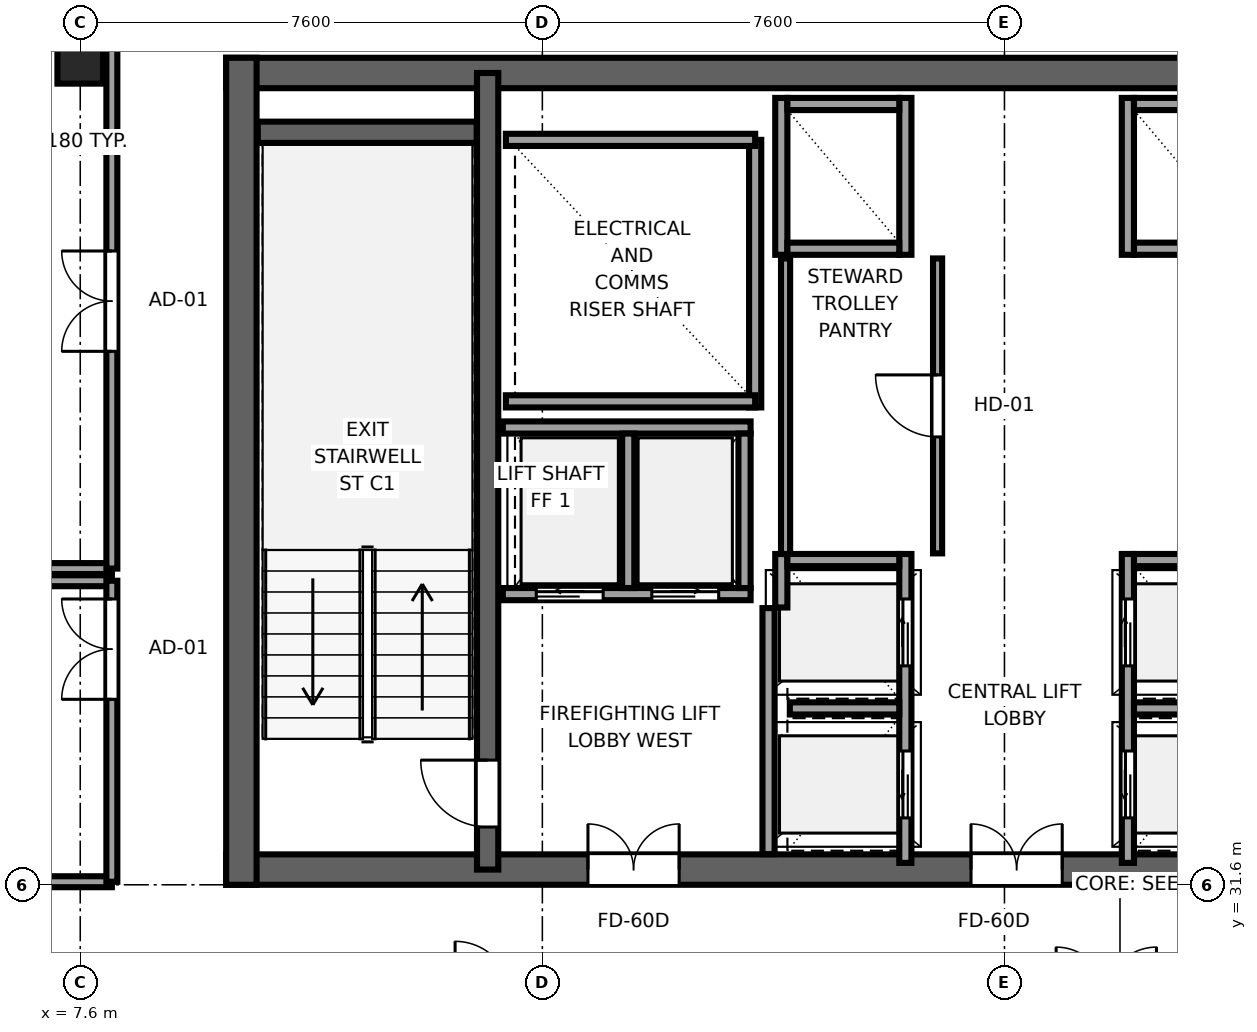
"""IFC4 building model, lengths in metres.
Left out: names, types, materials, properties, quantities, classifications, styles, units other than length and angle.
Written with IfcOpenShell. Run it as: python <this file> out.ifc"""

import sys

from ifc_helpers import new_model, si_unit, direction, frame, frame_2d, origin, origin_2d, place, context, subcontext, project, spatial, rectangle, extrude, source, transform, mapped, element, fill, save


model = new_model("IFC4")
c1 = context("Model", 3, precision=1e-05, world=origin(), true_north=direction((0.0, 1.0)))
c2 = subcontext(c1, "Body", "Model", "MODEL_VIEW")
j1 = project(units=[si_unit("LENGTHUNIT", "METRE"), si_unit("PLANEANGLEUNIT", "RADIAN")], contexts=[c1])
p1 = place(None, origin())
s1 = spatial("IfcSite", under=j1, at=p1, CompositionType="ELEMENT")
p2 = place(p1, origin())
s2 = spatial("IfcBuilding", under=s1, at=p2, CompositionType="ELEMENT")
p3 = place(p2, frame((0.0, 0.0, 231.0)))
s3 = spatial("IfcBuildingStorey", under=s2, at=p3, CompositionType="ELEMENT", Elevation=231.0)
p4 = place(p3, frame((10.0, 31.85, 0.0), z_axis=(0.0, 0.0, 1.0), x_axis=(1.0, 0.0, 0.0)))
e1 = element("IfcWall", 1, at=p4, inside=s3, PredefinedType="SHEAR", context=c2, shape_type="SweptSolid", body=[
    extrude(rectangle(XDim=26.0, YDim=0.5, at=frame_2d((13.0, 0.0))), origin(), (0.0, 0.0, 1.0), 3.55),
])
p5 = place(p4, frame((7.45, 0.0, 0.0), z_axis=(0.0, 0.0, 1.0), x_axis=(-1.0, 0.0, 0.0)))
e2 = element("IfcOpeningElement", 2, at=p5, cuts=e1, PredefinedType="OPENING", context=c2, shape_type="SweptSolid", body=[
    extrude(rectangle(XDim=1.5, YDim=2.04, at=frame_2d((0.75, 1.02))), frame((0.0, 0.26, 0.0), z_axis=(0.0, -1.0, 0.0), x_axis=(1.0, 0.0, 0.0)), (0.0, 0.0, 1.0), 0.52),
])
p6 = place(p4, frame((13.75, 0.0, 0.0), z_axis=(0.0, 0.0, 1.0), x_axis=(-1.0, 0.0, 0.0)))
e3 = element("IfcOpeningElement", 3, at=p6, cuts=e1, PredefinedType="OPENING", context=c2, shape_type="SweptSolid", body=[
    extrude(rectangle(XDim=1.5, YDim=2.04, at=frame_2d((0.75, 1.02))), frame((0.0, 0.26, 0.0), z_axis=(0.0, -1.0, 0.0), x_axis=(1.0, 0.0, 0.0)), (0.0, 0.0, 1.0), 0.52),
])
p7 = place(p4, frame((20.05, 0.0, 0.0), z_axis=(0.0, 0.0, 1.0), x_axis=(-1.0, 0.0, 0.0)))
e4 = element("IfcOpeningElement", 4, at=p7, cuts=e1, PredefinedType="OPENING", context=c2, shape_type="SweptSolid", body=[
    extrude(rectangle(XDim=1.5, YDim=2.04, at=frame_2d((0.75, 1.02))), frame((0.0, 0.26, 0.0), z_axis=(0.0, -1.0, 0.0), x_axis=(1.0, 0.0, 0.0)), (0.0, 0.0, 1.0), 0.52),
])
p8 = place(p3, frame((10.0, 44.95, 0.0), z_axis=(0.0, 0.0, 1.0), x_axis=(1.0, 0.0, 0.0)))
e5 = element("IfcWall", 5, at=p8, inside=s3, PredefinedType="SHEAR", context=c2, shape_type="SweptSolid", body=[
    extrude(rectangle(XDim=26.0, YDim=0.5, at=frame_2d((13.0, 0.0))), origin(), (0.0, 0.0, 1.0), 3.55),
])
p9 = place(p3, frame((10.25, 31.6, 0.0), z_axis=(0.0, 0.0, 1.0), x_axis=(0.0, 1.0, 0.0)))
e6 = element("IfcWall", 6, at=p9, inside=s3, PredefinedType="SHEAR", context=c2, shape_type="SweptSolid", body=[
    extrude(rectangle(XDim=13.6, YDim=0.5, at=frame_2d((6.8, 0.0))), origin(), (0.0, 0.0, 1.0), 3.55),
])
p10 = place(p3, frame((14.3, 31.85, 0.0), z_axis=(0.0, 0.0, 1.0), x_axis=(0.0, 1.0, 0.0)))
e7 = element("IfcWall", 7, at=p10, inside=s3, PredefinedType="SHEAR", context=c2, shape_type="SweptSolid", body=[
    extrude(rectangle(XDim=13.1, YDim=0.35, at=frame_2d((6.55, 0.0))), origin(), (0.0, 0.0, 1.0), 3.55),
])
p11 = place(p10, frame((0.7, 0.0, 0.0)))
e8 = element("IfcOpeningElement", 8, at=p11, cuts=e7, PredefinedType="OPENING", context=c2, shape_type="SweptSolid", body=[
    extrude(rectangle(XDim=1.1, YDim=2.12, at=frame_2d((0.55, 1.06))), frame((0.0, 0.185, 0.0), z_axis=(0.0, -1.0, 0.0), x_axis=(1.0, 0.0, 0.0)), (0.0, 0.0, 1.0), 0.37),
])
p12 = place(p3, frame((10.52, 43.975, 0.0), z_axis=(0.0, 0.0, 1.0), x_axis=(1.0, 0.0, 0.0)))
e9 = element("IfcWall", 9, at=p12, inside=s3, PredefinedType="SHEAR", context=c2, shape_type="SweptSolid", body=[
    extrude(rectangle(XDim=3.6, YDim=0.35, at=frame_2d((1.8, 0.0))), origin(), (0.0, 0.0, 1.0), 3.55),
])
m1 = source(origin(), c2, "Body", "SweptSolid", [
    extrude(rectangle(XDim=0.75, YDim=0.75, at=origin_2d()), origin(), (0.0, 0.0, 1.0), 3.55),
])
p13 = place(p3, frame((7.6, 45.15, 0.0), z_axis=(0.0, 0.0, 1.0), x_axis=(1.0, 0.0, 0.0)))
e10 = element("IfcColumn", 10, at=p13, inside=s3, PredefinedType="COLUMN", context=c2, shape_type="MappedRepresentation", body=[
    mapped(m1, transform((0.0, 0.0, 0.0), x_axis=(1.0, 0.0, 0.0), y_axis=(0.0, 1.0, 0.0), z_axis=(0.0, 0.0, 1.0), scale=1.0)),
])
p14 = place(p3, frame((18.7, 39.45, 0.0), z_axis=(0.0, 0.0, 1.0), x_axis=(0.0, 1.0, 0.0)))
e11 = element("IfcWall", 11, at=p14, inside=s3, PredefinedType="SOLIDWALL", context=c2, shape_type="SweptSolid", body=[
    extrude(rectangle(XDim=4.4, YDim=0.2, at=frame_2d((2.2, 0.0))), origin(), (0.0, 0.0, 1.0), 3.37),
])
for number, where, z_axis, x_axis in (
    (12, (14.6, 39.55, 0.0), (0.0, 0.0, 1.0), (1.0, 0.0, 0.0)),
    (13, (14.6, 43.85, 0.0), (0.0, 0.0, 1.0), (1.0, 0.0, 0.0)),
):
    element("IfcWall", number, at=place(p3, frame(where, z_axis=z_axis, x_axis=x_axis)), inside=s3, PredefinedType="SOLIDWALL", context=c2, shape_type="SweptSolid", body=[
        extrude(rectangle(XDim=4.1, YDim=0.2, at=frame_2d((2.05, 0.0))), origin(), (0.0, 0.0, 1.0), 3.37),
    ])
p15 = place(p3, frame((18.92, 32.104, 0.0), z_axis=(0.0, 0.0, 1.0), x_axis=(0.0, 1.0, 0.0)))
e14 = element("IfcWall", 14, at=p15, inside=s3, PredefinedType="SOLIDWALL", context=c2, shape_type="SweptSolid", body=[
    extrude(rectangle(XDim=4.046, YDim=0.2, at=frame_2d((2.023, 0.0))), origin(), (0.0, 0.0, 1.0), 3.37),
])
p16 = place(p3, frame((21.17, 31.96, 0.0), z_axis=(0.0, 0.0, 1.0), x_axis=(0.0, 1.0, 0.0)))
e15 = element("IfcWall", 15, at=p16, inside=s3, PredefinedType="SOLIDWALL", context=c2, shape_type="SweptSolid", body=[
    extrude(rectangle(XDim=5.08, YDim=0.2, at=frame_2d((2.54, 0.0))), origin(), (0.0, 0.0, 1.0), 3.37),
])
p17 = place(p16, frame((0.74, 0.0, 0.0)))
e16 = element("IfcOpeningElement", 16, at=p17, cuts=e15, PredefinedType="OPENING", context=c2, shape_type="SweptSolid", body=[
    extrude(rectangle(XDim=1.1, YDim=2.12, at=frame_2d((0.55, 1.06))), frame((0.0, 0.11, 0.0), z_axis=(0.0, -1.0, 0.0), x_axis=(1.0, 0.0, 0.0)), (0.0, 0.0, 1.0), 0.22),
])
p18 = place(p16, frame((3.24, 0.0, 0.0)))
e17 = element("IfcOpeningElement", 17, at=p18, cuts=e15, PredefinedType="OPENING", context=c2, shape_type="SweptSolid", body=[
    extrude(rectangle(XDim=1.1, YDim=2.12, at=frame_2d((0.55, 1.06))), frame((0.0, 0.11, 0.0), z_axis=(0.0, -1.0, 0.0), x_axis=(1.0, 0.0, 0.0)), (0.0, 0.0, 1.0), 0.22),
])
p19 = place(p3, frame((19.13, 36.16, 0.0), z_axis=(0.0, 0.0, 1.0), x_axis=(0.0, 1.0, 0.0)))
e18 = element("IfcWall", 18, at=p19, inside=s3, PredefinedType="SOLIDWALL", context=c2, shape_type="SweptSolid", body=[
    extrude(rectangle(XDim=0.88, YDim=0.2, at=frame_2d((0.44, 0.0))), origin(), (0.0, 0.0, 1.0), 3.37),
])
p20 = place(p3, frame((19.23, 36.94, 0.0), z_axis=(0.0, 0.0, 1.0), x_axis=(1.0, 0.0, 0.0)))
e19 = element("IfcWall", 19, at=p20, inside=s3, PredefinedType="SOLIDWALL", context=c2, shape_type="SweptSolid", body=[
    extrude(rectangle(XDim=1.84, YDim=0.2, at=frame_2d((0.92, 0.0))), origin(), (0.0, 0.0, 1.0), 3.37),
])
p21 = place(p3, frame((19.27, 34.5, 0.0), z_axis=(0.0, 0.0, 1.0), x_axis=(1.0, 0.0, 0.0)))
e20 = element("IfcWall", 20, at=p21, inside=s3, PredefinedType="SOLIDWALL", context=c2, shape_type="SweptSolid", body=[
    extrude(rectangle(XDim=1.8, YDim=0.2, at=frame_2d((0.9, 0.0))), origin(), (0.0, 0.0, 1.0), 3.37),
])
for number, where, z_axis, x_axis in (
    (21, (21.17, 41.96, 0.0), (0.0, 0.0, 1.0), (0.0, 1.0, 0.0)),
    (22, (19.13, 41.96, 0.0), (0.0, 0.0, 1.0), (0.0, 1.0, 0.0)),
):
    element("IfcWall", number, at=place(p3, frame(where, z_axis=z_axis, x_axis=x_axis)), inside=s3, PredefinedType="SOLIDWALL", context=c2, shape_type="SweptSolid", body=[
        extrude(rectangle(XDim=2.58, YDim=0.2, at=frame_2d((1.29, 0.0))), origin(), (0.0, 0.0, 1.0), 3.37),
    ])
for number, where, z_axis, x_axis in (
    (23, (19.23, 42.06, 0.0), (0.0, 0.0, 1.0), (1.0, 0.0, 0.0)),
    (24, (19.23, 44.44, 0.0), (0.0, 0.0, 1.0), (1.0, 0.0, 0.0)),
):
    element("IfcWall", number, at=place(p3, frame(where, z_axis=z_axis, x_axis=x_axis)), inside=s3, PredefinedType="SOLIDWALL", context=c2, shape_type="SweptSolid", body=[
        extrude(rectangle(XDim=1.84, YDim=0.2, at=frame_2d((0.92, 0.0))), origin(), (0.0, 0.0, 1.0), 3.37),
    ])
p22 = place(p3, frame((14.55, 36.38, 0.0), z_axis=(0.0, 0.0, 1.0), x_axis=(1.0, 0.0, 0.0)))
e25 = element("IfcWall", 25, at=p22, inside=s3, PredefinedType="SOLIDWALL", context=c2, shape_type="SweptSolid", body=[
    extrude(rectangle(XDim=4.075, YDim=0.2, at=frame_2d((2.038, 0.0))), origin(), (0.0, 0.0, 1.0), 3.37),
])
p23 = place(p22, frame((0.55, 0.0, 0.0)))
e26 = element("IfcOpeningElement", 26, at=p23, cuts=e25, PredefinedType="OPENING", context=c2, shape_type="SweptSolid", body=[
    extrude(rectangle(XDim=1.1, YDim=2.12, at=frame_2d((0.55, 1.06))), frame((0.0, 0.11, 0.0), z_axis=(0.0, -1.0, 0.0), x_axis=(1.0, 0.0, 0.0)), (0.0, 0.0, 1.0), 0.22),
])
p24 = place(p22, frame((2.45, 0.0, 0.0)))
e27 = element("IfcOpeningElement", 27, at=p24, cuts=e25, PredefinedType="OPENING", context=c2, shape_type="SweptSolid", body=[
    extrude(rectangle(XDim=1.1, YDim=2.12, at=frame_2d((0.55, 1.06))), frame((0.0, 0.11, 0.0), z_axis=(0.0, -1.0, 0.0), x_axis=(1.0, 0.0, 0.0)), (0.0, 0.0, 1.0), 0.22),
])
p25 = place(p3, frame((14.55, 39.12, 0.0), z_axis=(0.0, 0.0, 1.0), x_axis=(1.0, 0.0, 0.0)))
e28 = element("IfcWall", 28, at=p25, inside=s3, PredefinedType="SOLIDWALL", context=c2, shape_type="SweptSolid", body=[
    extrude(rectangle(XDim=4.075, YDim=0.2, at=frame_2d((2.038, 0.0))), origin(), (0.0, 0.0, 1.0), 3.37),
])
for number, where, z_axis, x_axis in (
    (29, (18.525, 36.48, 0.0), (0.0, 0.0, 1.0), (0.0, 1.0, 0.0)),
    (30, (16.613, 36.48, 0.0), (0.0, 0.0, 1.0), (0.0, 1.0, 0.0)),
):
    element("IfcWall", number, at=place(p3, frame(where, z_axis=z_axis, x_axis=x_axis)), inside=s3, PredefinedType="SOLIDWALL", context=c2, shape_type="SweptSolid", body=[
        extrude(rectangle(XDim=2.54, YDim=0.2, at=frame_2d((1.27, 0.0))), origin(), (0.0, 0.0, 1.0), 3.37),
    ])
p26 = place(p3, frame((24.83, 31.96, 0.0), z_axis=(0.0, 0.0, 1.0), x_axis=(0.0, 1.0, 0.0)))
e31 = element("IfcWall", 31, at=p26, inside=s3, PredefinedType="SOLIDWALL", context=c2, shape_type="SweptSolid", body=[
    extrude(rectangle(XDim=5.08, YDim=0.2, at=frame_2d((2.54, 0.0))), origin(), (0.0, 0.0, 1.0), 3.37),
])
p27 = place(p26, frame((0.74, 0.0, 0.0)))
e32 = element("IfcOpeningElement", 32, at=p27, cuts=e31, PredefinedType="OPENING", context=c2, shape_type="SweptSolid", body=[
    extrude(rectangle(XDim=1.1, YDim=2.12, at=frame_2d((0.55, 1.06))), frame((0.0, 0.11, 0.0), z_axis=(0.0, -1.0, 0.0), x_axis=(1.0, 0.0, 0.0)), (0.0, 0.0, 1.0), 0.22),
])
p28 = place(p26, frame((3.24, 0.0, 0.0)))
e33 = element("IfcOpeningElement", 33, at=p28, cuts=e31, PredefinedType="OPENING", context=c2, shape_type="SweptSolid", body=[
    extrude(rectangle(XDim=1.1, YDim=2.12, at=frame_2d((0.55, 1.06))), frame((0.0, 0.11, 0.0), z_axis=(0.0, -1.0, 0.0), x_axis=(1.0, 0.0, 0.0)), (0.0, 0.0, 1.0), 0.22),
])
p29 = place(p3, frame((24.93, 36.94, 0.0), z_axis=(0.0, 0.0, 1.0), x_axis=(1.0, 0.0, 0.0)))
e34 = element("IfcWall", 34, at=p29, inside=s3, PredefinedType="SOLIDWALL", context=c2, shape_type="SweptSolid", body=[
    extrude(rectangle(XDim=1.84, YDim=0.2, at=frame_2d((0.92, 0.0))), origin(), (0.0, 0.0, 1.0), 3.37),
])
p30 = place(p3, frame((24.93, 34.5, 0.0), z_axis=(0.0, 0.0, 1.0), x_axis=(1.0, 0.0, 0.0)))
e35 = element("IfcWall", 35, at=p30, inside=s3, PredefinedType="SOLIDWALL", context=c2, shape_type="SweptSolid", body=[
    extrude(rectangle(XDim=1.8, YDim=0.2, at=frame_2d((0.9, 0.0))), origin(), (0.0, 0.0, 1.0), 3.37),
])
p31 = place(p3, frame((24.83, 41.96, 0.0), z_axis=(0.0, 0.0, 1.0), x_axis=(0.0, 1.0, 0.0)))
e36 = element("IfcWall", 36, at=p31, inside=s3, PredefinedType="SOLIDWALL", context=c2, shape_type="SweptSolid", body=[
    extrude(rectangle(XDim=2.58, YDim=0.2, at=frame_2d((1.29, 0.0))), origin(), (0.0, 0.0, 1.0), 3.37),
])
for number, where, z_axis, x_axis in (
    (37, (24.93, 42.06, 0.0), (0.0, 0.0, 1.0), (1.0, 0.0, 0.0)),
    (38, (24.93, 44.44, 0.0), (0.0, 0.0, 1.0), (1.0, 0.0, 0.0)),
):
    element("IfcWall", number, at=place(p3, frame(where, z_axis=z_axis, x_axis=x_axis)), inside=s3, PredefinedType="SOLIDWALL", context=c2, shape_type="SweptSolid", body=[
        extrude(rectangle(XDim=1.84, YDim=0.2, at=frame_2d((0.92, 0.0))), origin(), (0.0, 0.0, 1.0), 3.37),
    ])
p32 = place(p3, frame((21.7, 37.05, 0.0), z_axis=(0.0, 0.0, 1.0), x_axis=(0.0, 1.0, 0.0)))
e39 = element("IfcWall", 39, at=p32, inside=s3, PredefinedType="PARTITIONING", context=c2, shape_type="SweptSolid", body=[
    extrude(rectangle(XDim=4.85, YDim=0.15, at=frame_2d((2.425, 0.0))), origin(), (0.0, 0.0, 1.0), 3.37),
])
p33 = place(p32, frame((1.915, 0.0, 0.0)))
e40 = element("IfcOpeningElement", 40, at=p33, cuts=e39, PredefinedType="OPENING", context=c2, shape_type="SweptSolid", body=[
    extrude(rectangle(XDim=1.02, YDim=2.03, at=frame_2d((0.51, 1.015))), frame((0.0, 0.085, 0.0), z_axis=(0.0, -1.0, 0.0), x_axis=(1.0, 0.0, 0.0)), (0.0, 0.0, 1.0), 0.17),
])
p34 = place(p3, frame((19.2, 37.04, 0.0), z_axis=(0.0, 0.0, 1.0), x_axis=(0.0, 1.0, 0.0)))
e41 = element("IfcWall", 41, at=p34, inside=s3, PredefinedType="PARTITIONING", context=c2, shape_type="SweptSolid", body=[
    extrude(rectangle(XDim=4.86, YDim=0.15, at=frame_2d((2.43, 0.0))), origin(), (0.0, 0.0, 1.0), 3.37),
])
for number, where, z_axis, x_axis in (
    (42, (3.005, 31.65, 0.0), (0.0, 0.0, 1.0), (1.0, 0.0, 0.0)),
    (43, (3.005, 36.6, 0.0), (0.0, 0.0, 1.0), (1.0, 0.0, 0.0)),
):
    element("IfcWall", number, at=place(p3, frame(where, z_axis=z_axis, x_axis=x_axis)), inside=s3, PredefinedType="PARTITIONING", context=c2, shape_type="SweptSolid", body=[
        extrude(rectangle(XDim=5.115, YDim=0.18, at=frame_2d((2.558, 0.0))), origin(), (0.0, 0.0, 1.0), 3.37),
    ])
p35 = place(p3, frame((8.12, 31.65, 0.0), z_axis=(0.0, 0.0, 1.0), x_axis=(0.0, 1.0, 0.0)))
e44 = element("IfcWall", 44, at=p35, inside=s3, PredefinedType="PARTITIONING", context=c2, shape_type="SweptSolid", body=[
    extrude(rectangle(XDim=4.95, YDim=0.18, at=frame_2d((2.475, 0.0))), origin(), (0.0, 0.0, 1.0), 3.37),
])
p36 = place(p35, frame((3.0, 0.0, 0.0)))
e45 = element("IfcOpeningElement", 45, at=p36, cuts=e44, PredefinedType="OPENING", context=c2, shape_type="SweptSolid", body=[
    extrude(rectangle(XDim=1.65, YDim=2.15, at=frame_2d((0.825, 1.075))), frame((0.0, 0.1, 0.0), z_axis=(0.0, -1.0, 0.0), x_axis=(1.0, 0.0, 0.0)), (0.0, 0.0, 1.0), 0.2),
])
p37 = place(p3, frame((3.005, 36.8, 0.0), z_axis=(0.0, 0.0, 1.0), x_axis=(1.0, 0.0, 0.0)))
e46 = element("IfcWall", 46, at=p37, inside=s3, PredefinedType="PARTITIONING", context=c2, shape_type="SweptSolid", body=[
    extrude(rectangle(XDim=5.115, YDim=0.18, at=frame_2d((2.558, 0.0))), origin(), (0.0, 0.0, 1.0), 3.37),
])
p38 = place(p3, frame((8.12, 36.8, 0.0), z_axis=(0.0, 0.0, 1.0), x_axis=(0.0, 1.0, 0.0)))
e47 = element("IfcWall", 47, at=p38, inside=s3, PredefinedType="PARTITIONING", context=c2, shape_type="SweptSolid", body=[
    extrude(rectangle(XDim=8.795, YDim=0.18, at=frame_2d((4.397, 0.0))), origin(), (0.0, 0.0, 1.0), 3.37),
])
p39 = place(p38, frame((3.573, 0.0, 0.0)))
e48 = element("IfcOpeningElement", 48, at=p39, cuts=e47, PredefinedType="OPENING", context=c2, shape_type="SweptSolid", body=[
    extrude(rectangle(XDim=1.65, YDim=2.15, at=frame_2d((0.825, 1.075))), frame((0.0, 0.1, 0.0), z_axis=(0.0, -1.0, 0.0), x_axis=(1.0, 0.0, 0.0)), (0.0, 0.0, 1.0), 0.2),
])
m2 = source(origin(), c2, "Body", "SweptSolid", [
    extrude(rectangle(XDim=1.1, YDim=2.12, at=frame_2d((0.55, 1.06))), frame((0.0, 0.025, 0.0), z_axis=(0.0, -1.0, 0.0), x_axis=(1.0, 0.0, 0.0)), (0.0, 0.0, 1.0), 0.05),
])
p40 = place(p11, origin())
e49 = element("IfcDoor", 49, at=p40, inside=s3, OperationType="SINGLE_SWING_RIGHT", PredefinedType="DOOR", context=c2, shape_type="MappedRepresentation", body=[
    mapped(m2, transform((0.0, 0.0, 0.0), x_axis=(1.0, 0.0, 0.0), y_axis=(0.0, 1.0, 0.0), z_axis=(0.0, 0.0, 1.0), scale=1.0)),
])
fill(e8, e49)
m3 = source(origin(), c2, "Body", "SweptSolid", [
    extrude(rectangle(XDim=1.5, YDim=2.04, at=frame_2d((0.75, 1.02))), frame((0.0, 0.025, 0.0), z_axis=(0.0, -1.0, 0.0), x_axis=(1.0, 0.0, 0.0)), (0.0, 0.0, 1.0), 0.05),
])
p41 = place(p5, origin())
e50 = element("IfcDoor", 50, at=p41, inside=s3, OperationType="DOUBLE_DOOR_SINGLE_SWING", PredefinedType="DOOR", context=c2, shape_type="MappedRepresentation", body=[
    mapped(m3, transform((0.0, 0.0, 0.0), x_axis=(1.0, 0.0, 0.0), y_axis=(0.0, 1.0, 0.0), z_axis=(0.0, 0.0, 1.0), scale=1.0)),
])
fill(e2, e50)
p42 = place(p6, origin())
e51 = element("IfcDoor", 51, at=p42, inside=s3, OperationType="DOUBLE_DOOR_SINGLE_SWING", PredefinedType="DOOR", context=c2, shape_type="MappedRepresentation", body=[
    mapped(m3, transform((0.0, 0.0, 0.0), x_axis=(1.0, 0.0, 0.0), y_axis=(0.0, 1.0, 0.0), z_axis=(0.0, 0.0, 1.0), scale=1.0)),
])
fill(e3, e51)
m4 = source(origin(), c2, "Body", "SweptSolid", [
    extrude(rectangle(XDim=1.1, YDim=2.12, at=frame_2d((0.55, 1.06))), frame((0.0, 0.025, 0.0), z_axis=(0.0, -1.0, 0.0), x_axis=(1.0, 0.0, 0.0)), (0.0, 0.0, 1.0), 0.05),
])
p43 = place(p17, origin())
e52 = element("IfcDoor", 52, at=p43, inside=s3, OperationType="SLIDING_TO_LEFT", PredefinedType="DOOR", context=c2, shape_type="MappedRepresentation", body=[
    mapped(m4, transform((0.0, 0.0, 0.0), x_axis=(1.0, 0.0, 0.0), y_axis=(0.0, 1.0, 0.0), z_axis=(0.0, 0.0, 1.0), scale=1.0)),
])
fill(e16, e52)
p44 = place(p18, origin())
e53 = element("IfcDoor", 53, at=p44, inside=s3, OperationType="SLIDING_TO_RIGHT", PredefinedType="DOOR", context=c2, shape_type="MappedRepresentation", body=[
    mapped(m4, transform((0.0, 0.0, 0.0), x_axis=(1.0, 0.0, 0.0), y_axis=(0.0, 1.0, 0.0), z_axis=(0.0, 0.0, 1.0), scale=1.0)),
])
fill(e17, e53)
p45 = place(p23, origin())
e54 = element("IfcDoor", 54, at=p45, inside=s3, OperationType="SLIDING_TO_LEFT", PredefinedType="DOOR", context=c2, shape_type="MappedRepresentation", body=[
    mapped(m4, transform((0.0, 0.0, 0.0), x_axis=(1.0, 0.0, 0.0), y_axis=(0.0, 1.0, 0.0), z_axis=(0.0, 0.0, 1.0), scale=1.0)),
])
fill(e26, e54)
p46 = place(p24, origin())
e55 = element("IfcDoor", 55, at=p46, inside=s3, OperationType="SLIDING_TO_RIGHT", PredefinedType="DOOR", context=c2, shape_type="MappedRepresentation", body=[
    mapped(m4, transform((0.0, 0.0, 0.0), x_axis=(1.0, 0.0, 0.0), y_axis=(0.0, 1.0, 0.0), z_axis=(0.0, 0.0, 1.0), scale=1.0)),
])
fill(e27, e55)
p47 = place(p27, origin())
e56 = element("IfcDoor", 56, at=p47, inside=s3, OperationType="SLIDING_TO_LEFT", PredefinedType="DOOR", context=c2, shape_type="MappedRepresentation", body=[
    mapped(m4, transform((0.0, 0.0, 0.0), x_axis=(1.0, 0.0, 0.0), y_axis=(0.0, 1.0, 0.0), z_axis=(0.0, 0.0, 1.0), scale=1.0)),
])
fill(e32, e56)
p48 = place(p28, origin())
e57 = element("IfcDoor", 57, at=p48, inside=s3, OperationType="SLIDING_TO_RIGHT", PredefinedType="DOOR", context=c2, shape_type="MappedRepresentation", body=[
    mapped(m4, transform((0.0, 0.0, 0.0), x_axis=(1.0, 0.0, 0.0), y_axis=(0.0, 1.0, 0.0), z_axis=(0.0, 0.0, 1.0), scale=1.0)),
])
fill(e33, e57)
m5 = source(origin(), c2, "Body", "SweptSolid", [
    extrude(rectangle(XDim=1.02, YDim=2.03, at=frame_2d((0.51, 1.015))), frame((0.0, 0.025, 0.0), z_axis=(0.0, -1.0, 0.0), x_axis=(1.0, 0.0, 0.0)), (0.0, 0.0, 1.0), 0.05),
])
p49 = place(p33, origin())
e58 = element("IfcDoor", 58, at=p49, inside=s3, OperationType="SINGLE_SWING_RIGHT", PredefinedType="DOOR", context=c2, shape_type="MappedRepresentation", body=[
    mapped(m5, transform((0.0, 0.0, 0.0), x_axis=(1.0, 0.0, 0.0), y_axis=(0.0, 1.0, 0.0), z_axis=(0.0, 0.0, 1.0), scale=1.0)),
])
fill(e40, e58)
m6 = source(origin(), c2, "Body", "SweptSolid", [
    extrude(rectangle(XDim=1.65, YDim=2.15, at=frame_2d((0.825, 1.075))), frame((0.0, 0.025, 0.0), z_axis=(0.0, -1.0, 0.0), x_axis=(1.0, 0.0, 0.0)), (0.0, 0.0, 1.0), 0.05),
])
p50 = place(p36, origin())
e59 = element("IfcDoor", 59, at=p50, inside=s3, OperationType="DOUBLE_DOOR_SINGLE_SWING", PredefinedType="DOOR", context=c2, shape_type="MappedRepresentation", body=[
    mapped(m6, transform((0.0, 0.0, 0.0), x_axis=(1.0, 0.0, 0.0), y_axis=(0.0, 1.0, 0.0), z_axis=(0.0, 0.0, 1.0), scale=1.0)),
])
fill(e45, e59)
p51 = place(p39, origin())
e60 = element("IfcDoor", 60, at=p51, inside=s3, OperationType="DOUBLE_DOOR_SINGLE_SWING", PredefinedType="DOOR", context=c2, shape_type="MappedRepresentation", body=[
    mapped(m6, transform((0.0, 0.0, 0.0), x_axis=(1.0, 0.0, 0.0), y_axis=(0.0, 1.0, 0.0), z_axis=(0.0, 0.0, 1.0), scale=1.0)),
])
fill(e48, e60)
save(model, sys.argv[1])
